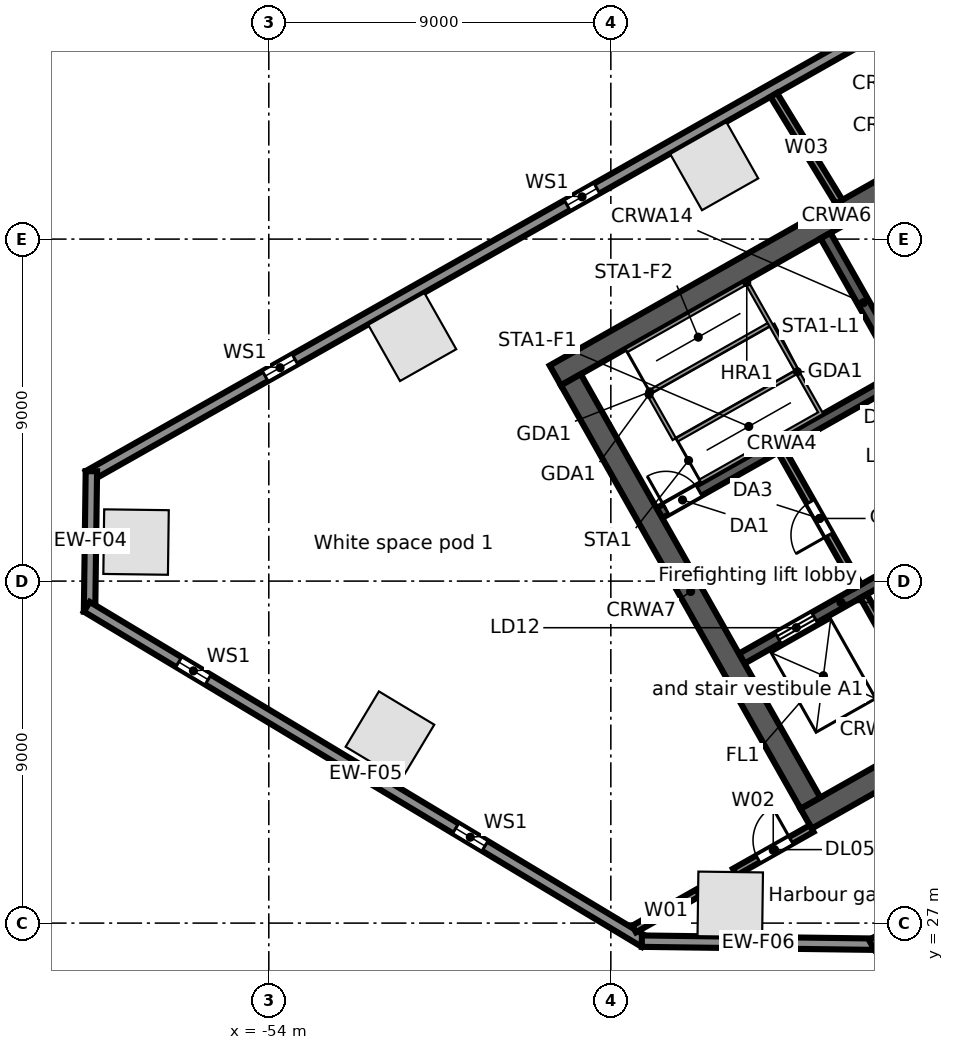
"""IFC4 building model, lengths in metres.
Left out: names, types, materials, properties, quantities, classifications, styles, units other than length and angle.
Written with IfcOpenShell. Run it as: python <this file> out.ifc"""

import sys

from ifc_helpers import new_model, si_unit, direction, frame, frame_2d, origin, origin_2d, place, context, subcontext, project, spatial, rectangle, extrude, element, fill, save


model = new_model("IFC4")
c1 = context("Model", 3, precision=1e-05, world=origin(), true_north=direction((0.0, 1.0)))
c2 = subcontext(c1, "Body", "Model", "MODEL_VIEW")
j1 = project(units=[si_unit("LENGTHUNIT", "METRE"), si_unit("PLANEANGLEUNIT", "RADIAN")], contexts=[c1])
p1 = place(None, origin())
s1 = spatial("IfcSite", under=j1, at=p1, CompositionType="ELEMENT")
p2 = place(p1, origin())
s2 = spatial("IfcBuilding", under=s1, at=p2, CompositionType="ELEMENT")
p3 = place(p2, frame((0.0, 0.0, 36.5)))
s3 = spatial("IfcBuildingStorey", under=s2, at=p3, CompositionType="ELEMENT", Elevation=36.5)
for number, where, z_axis, x_axis in (
    (1, (-42.28, 46.919, 0.0), (0.0, 0.0, 1.0), (-0.87, -0.492, 0.0)),
    (2, (-50.226, 42.423, 0.0), (0.0, 0.0, 1.0), (-0.87, -0.492, 0.0)),
    (3, (-57.493, 37.027, 0.0), (0.0, 0.0, 1.0), (-0.013, -1.0, 0.0)),
    (4, (-50.812, 31.931, 0.0), (0.0, 0.0, 1.0), (0.857, -0.515, 0.0)),
    (5, (-41.858, 27.495, 0.0), (0.0, 0.0, 1.0), (1.0, -0.013, 0.0)),
):
    element("IfcColumn", number, at=place(p3, frame(where, z_axis=z_axis, x_axis=x_axis)), inside=s3, PredefinedType="COLUMN", context=c2, shape_type="SweptSolid", body=[
        extrude(rectangle(XDim=1.7, YDim=1.7, at=origin_2d()), origin(), (0.0, 0.0, 1.0), 5.0),
    ])
p4 = place(p3, frame((-58.745, 38.764, 0.0), z_axis=(0.0, 0.0, 1.0), x_axis=(0.870355811726, 0.492423355453, 0.0)))
e6 = element("IfcWall", 6, at=p4, inside=s3, PredefinedType="STANDARD", context=c2, shape_type="SweptSolid", body=[
    extrude(rectangle(XDim=64.025, YDim=0.3, at=frame_2d((32.013, 0.0))), origin(), (0.0, 0.0, 1.0), 4.68),
])
p5 = place(p4, frame((60.122, 0.0, 0.6)))
e7 = element("IfcOpeningElement", 7, at=p5, cuts=e6, PredefinedType="OPENING", context=c2, shape_type="SweptSolid", body=[
    extrude(rectangle(XDim=0.9, YDim=3.2, at=frame_2d((0.45, 1.6))), frame((0.0, 0.16, 0.0), z_axis=(0.0, -1.0, 0.0), x_axis=(1.0, 0.0, 0.0)), (0.0, 0.0, 1.0), 0.32),
])
p6 = place(p4, frame((50.992, 0.0, 0.6)))
e8 = element("IfcOpeningElement", 8, at=p6, cuts=e6, PredefinedType="OPENING", context=c2, shape_type="SweptSolid", body=[
    extrude(rectangle(XDim=0.9, YDim=3.2, at=frame_2d((0.45, 1.6))), frame((0.0, 0.16, 0.0), z_axis=(0.0, -1.0, 0.0), x_axis=(1.0, 0.0, 0.0)), (0.0, 0.0, 1.0), 0.32),
])
p7 = place(p4, frame((41.862, 0.0, 0.6)))
e9 = element("IfcOpeningElement", 9, at=p7, cuts=e6, PredefinedType="OPENING", context=c2, shape_type="SweptSolid", body=[
    extrude(rectangle(XDim=0.9, YDim=3.2, at=frame_2d((0.45, 1.6))), frame((0.0, 0.16, 0.0), z_axis=(0.0, -1.0, 0.0), x_axis=(1.0, 0.0, 0.0)), (0.0, 0.0, 1.0), 0.32),
])
p8 = place(p4, frame((32.732, 0.0, 0.6)))
e10 = element("IfcOpeningElement", 10, at=p8, cuts=e6, PredefinedType="OPENING", context=c2, shape_type="SweptSolid", body=[
    extrude(rectangle(XDim=0.9, YDim=3.2, at=frame_2d((0.45, 1.6))), frame((0.0, 0.16, 0.0), z_axis=(0.0, -1.0, 0.0), x_axis=(1.0, 0.0, 0.0)), (0.0, 0.0, 1.0), 0.32),
])
p9 = place(p4, frame((23.602, 0.0, 0.6)))
e11 = element("IfcOpeningElement", 11, at=p9, cuts=e6, PredefinedType="OPENING", context=c2, shape_type="SweptSolid", body=[
    extrude(rectangle(XDim=0.9, YDim=3.2, at=frame_2d((0.45, 1.6))), frame((0.0, 0.16, 0.0), z_axis=(0.0, -1.0, 0.0), x_axis=(1.0, 0.0, 0.0)), (0.0, 0.0, 1.0), 0.32),
])
p10 = place(p4, frame((14.472, 0.0, 0.6)))
e12 = element("IfcOpeningElement", 12, at=p10, cuts=e6, PredefinedType="OPENING", context=c2, shape_type="SweptSolid", body=[
    extrude(rectangle(XDim=0.9, YDim=3.2, at=frame_2d((0.45, 1.6))), frame((0.0, 0.16, 0.0), z_axis=(0.0, -1.0, 0.0), x_axis=(1.0, 0.0, 0.0)), (0.0, 0.0, 1.0), 0.32),
])
p11 = place(p4, frame((5.342, 0.0, 0.6)))
e13 = element("IfcOpeningElement", 13, at=p11, cuts=e6, PredefinedType="OPENING", context=c2, shape_type="SweptSolid", body=[
    extrude(rectangle(XDim=0.9, YDim=3.2, at=frame_2d((0.45, 1.6))), frame((0.0, 0.16, 0.0), z_axis=(0.0, -1.0, 0.0), x_axis=(1.0, 0.0, 0.0)), (0.0, 0.0, 1.0), 0.32),
])
p12 = place(p3, frame((-58.717, 35.194, 0.0), z_axis=(0.0, 0.0, 1.0), x_axis=(0.013069053407, 0.999914596275, 0.0)))
e14 = element("IfcWall", 14, at=p12, inside=s3, PredefinedType="STANDARD", context=c2, shape_type="SweptSolid", body=[
    extrude(rectangle(XDim=3.699, YDim=0.3, at=frame_2d((1.849, 0.0))), origin(), (0.0, 0.0, 1.0), 4.68),
])
p13 = place(p3, frame((-44.109, 26.504, 0.0), z_axis=(0.0, 0.0, 1.0), x_axis=(-0.857169502585, 0.515034410344, 0.0)))
e15 = element("IfcWall", 15, at=p13, inside=s3, PredefinedType="STANDARD", context=c2, shape_type="SweptSolid", body=[
    extrude(rectangle(XDim=17.127, YDim=0.3, at=frame_2d((8.563, 0.0))), origin(), (0.0, 0.0, 1.0), 4.68),
])
p14 = place(p13, frame((13.403, 0.0, 0.6)))
e16 = element("IfcOpeningElement", 16, at=p14, cuts=e15, PredefinedType="OPENING", context=c2, shape_type="SweptSolid", body=[
    extrude(rectangle(XDim=0.9, YDim=3.2, at=frame_2d((0.45, 1.6))), frame((0.0, 0.16, 0.0), z_axis=(0.0, -1.0, 0.0), x_axis=(1.0, 0.0, 0.0)), (0.0, 0.0, 1.0), 0.32),
])
p15 = place(p13, frame((4.903, 0.0, 0.6)))
e17 = element("IfcOpeningElement", 17, at=p15, cuts=e15, PredefinedType="OPENING", context=c2, shape_type="SweptSolid", body=[
    extrude(rectangle(XDim=0.9, YDim=3.2, at=frame_2d((0.45, 1.6))), frame((0.0, 0.16, 0.0), z_axis=(0.0, -1.0, 0.0), x_axis=(1.0, 0.0, 0.0)), (0.0, 0.0, 1.0), 0.32),
])
p16 = place(p3, frame((-38.057, 26.445, 0.0), z_axis=(0.0, 0.0, 1.0), x_axis=(-0.999914086342, 0.013108010296, 0.0)))
e18 = element("IfcWall", 18, at=p16, inside=s3, PredefinedType="STANDARD", context=c2, shape_type="SweptSolid", body=[
    extrude(rectangle(XDim=6.128, YDim=0.3, at=frame_2d((3.064, 0.0))), origin(), (0.0, 0.0, 1.0), 4.68),
])
p17 = place(p3, frame((-0.055, 47.969, 0.0), z_axis=(0.0, 0.0, 1.0), x_axis=(-0.870355730478, -0.492423499058, 0.0)))
e19 = element("IfcWall", 19, at=p17, inside=s3, PredefinedType="STANDARD", context=c2, shape_type="SweptSolid", body=[
    extrude(rectangle(XDim=43.75, YDim=0.3, at=frame_2d((21.875, 0.0))), origin(), (0.0, 0.0, 1.0), 4.68),
])
p18 = place(p17, frame((39.977, 0.0, 0.6)))
e20 = element("IfcOpeningElement", 20, at=p18, cuts=e19, PredefinedType="OPENING", context=c2, shape_type="SweptSolid", body=[
    extrude(rectangle(XDim=0.9, YDim=3.2, at=frame_2d((0.45, 1.6))), frame((0.0, 0.16, 0.0), z_axis=(0.0, -1.0, 0.0), x_axis=(1.0, 0.0, 0.0)), (0.0, 0.0, 1.0), 0.32),
])
p19 = place(p17, frame((31.222, 0.0, 0.6)))
e21 = element("IfcOpeningElement", 21, at=p19, cuts=e19, PredefinedType="OPENING", context=c2, shape_type="SweptSolid", body=[
    extrude(rectangle(XDim=0.9, YDim=3.2, at=frame_2d((0.45, 1.6))), frame((0.0, 0.16, 0.0), z_axis=(0.0, -1.0, 0.0), x_axis=(1.0, 0.0, 0.0)), (0.0, 0.0, 1.0), 0.32),
])
p20 = place(p17, frame((22.468, 0.0, 0.6)))
e22 = element("IfcOpeningElement", 22, at=p20, cuts=e19, PredefinedType="OPENING", context=c2, shape_type="SweptSolid", body=[
    extrude(rectangle(XDim=0.9, YDim=3.2, at=frame_2d((0.45, 1.6))), frame((0.0, 0.16, 0.0), z_axis=(0.0, -1.0, 0.0), x_axis=(1.0, 0.0, 0.0)), (0.0, 0.0, 1.0), 0.32),
])
p21 = place(p17, frame((13.713, 0.0, 0.6)))
e23 = element("IfcOpeningElement", 23, at=p21, cuts=e19, PredefinedType="OPENING", context=c2, shape_type="SweptSolid", body=[
    extrude(rectangle(XDim=0.9, YDim=3.2, at=frame_2d((0.45, 1.6))), frame((0.0, 0.16, 0.0), z_axis=(0.0, -1.0, 0.0), x_axis=(1.0, 0.0, 0.0)), (0.0, 0.0, 1.0), 0.32),
])
p22 = place(p17, frame((4.959, 0.0, 0.6)))
e24 = element("IfcOpeningElement", 24, at=p22, cuts=e19, PredefinedType="OPENING", context=c2, shape_type="SweptSolid", body=[
    extrude(rectangle(XDim=0.9, YDim=3.2, at=frame_2d((0.45, 1.6))), frame((0.0, 0.16, 0.0), z_axis=(0.0, -1.0, 0.0), x_axis=(1.0, 0.0, 0.0)), (0.0, 0.0, 1.0), 0.32),
])
p23 = place(p3, frame((-39.862, 29.749, 0.0), z_axis=(0.0, 0.0, 1.0), x_axis=(0.870350116061, 0.492433422375, 0.0)))
e25 = element("IfcWall", 25, at=p23, inside=s3, PredefinedType="SOLIDWALL", context=c2, shape_type="SweptSolid", body=[
    extrude(rectangle(XDim=17.0, YDim=0.6, at=frame_2d((8.5, 0.0))), origin(), (0.0, 0.0, 1.0), 4.68),
])
p24 = place(p23, frame((7.2, 0.0, 0.0)))
e26 = element("IfcOpeningElement", 26, at=p24, cuts=e25, PredefinedType="OPENING", context=c2, shape_type="SweptSolid", body=[
    extrude(rectangle(XDim=1.2, YDim=2.1, at=frame_2d((0.6, 1.05))), frame((0.0, 0.31, 0.0), z_axis=(0.0, -1.0, 0.0), x_axis=(1.0, 0.0, 0.0)), (0.0, 0.0, 1.0), 0.62),
])
p25 = place(p3, frame((-41.556, 33.961, 0.0), z_axis=(0.0, 0.0, 1.0), x_axis=(0.870343731308, 0.492444706919, 0.0)))
e27 = element("IfcWall", 27, at=p25, inside=s3, PredefinedType="SOLIDWALL", context=c2, shape_type="SweptSolid", body=[
    extrude(rectangle(XDim=6.0, YDim=0.3, at=frame_2d((3.0, 0.0))), origin(), (0.0, 0.0, 1.0), 4.68),
])
p26 = place(p25, frame((1.1, 0.0, 0.0)))
e28 = element("IfcOpeningElement", 28, at=p26, cuts=e27, PredefinedType="OPENING", context=c2, shape_type="SweptSolid", body=[
    extrude(rectangle(XDim=1.1, YDim=2.1, at=frame_2d((0.55, 1.05))), frame((0.0, 0.16, 0.0), z_axis=(0.0, -1.0, 0.0), x_axis=(1.0, 0.0, 0.0)), (0.0, 0.0, 1.0), 0.32),
])
p27 = place(p25, frame((4.25, 0.0, 0.0)))
e29 = element("IfcOpeningElement", 29, at=p27, cuts=e27, PredefinedType="OPENING", context=c2, shape_type="SweptSolid", body=[
    extrude(rectangle(XDim=1.1, YDim=2.1, at=frame_2d((0.55, 1.05))), frame((0.0, 0.16, 0.0), z_axis=(0.0, -1.0, 0.0), x_axis=(1.0, 0.0, 0.0)), (0.0, 0.0, 1.0), 0.32),
])
p28 = place(p3, frame((-43.723, 37.791, 0.0), z_axis=(0.0, 0.0, 1.0), x_axis=(0.87035077051, 0.49243226567, 0.0)))
e30 = element("IfcWall", 30, at=p28, inside=s3, PredefinedType="SOLIDWALL", context=c2, shape_type="SweptSolid", body=[
    extrude(rectangle(XDim=7.4, YDim=0.3, at=frame_2d((3.7, 0.0))), origin(), (0.0, 0.0, 1.0), 4.68),
])
p29 = place(p28, frame((0.2, 0.0, 0.0)))
e31 = element("IfcOpeningElement", 31, at=p29, cuts=e30, PredefinedType="OPENING", context=c2, shape_type="SweptSolid", body=[
    extrude(rectangle(XDim=1.0, YDim=2.1, at=frame_2d((0.5, 1.05))), frame((0.0, 0.16, 0.0), z_axis=(0.0, -1.0, 0.0), x_axis=(1.0, 0.0, 0.0)), (0.0, 0.0, 1.0), 0.32),
])
p30 = place(p3, frame((-46.461, 41.412, 0.0), z_axis=(0.0, 0.0, 1.0), x_axis=(0.870350116061, 0.492433422375, 0.0)))
e32 = element("IfcWall", 32, at=p30, inside=s3, PredefinedType="SOLIDWALL", context=c2, shape_type="SweptSolid", body=[
    extrude(rectangle(XDim=17.0, YDim=0.6, at=frame_2d((8.5, 0.0))), origin(), (0.0, 0.0, 1.0), 4.68),
])
p31 = place(p3, frame((-46.052, 41.298, 0.0), z_axis=(0.0, 0.0, 1.0), x_axis=(0.492418598281, -0.870358503186, 0.0)))
e33 = element("IfcWall", 33, at=p31, inside=s3, PredefinedType="SOLIDWALL", context=c2, shape_type="SweptSolid", body=[
    extrude(rectangle(XDim=12.8, YDim=0.6, at=frame_2d((6.4, 0.0))), origin(), (0.0, 0.0, 1.0), 4.68),
])
p32 = place(p3, frame((-38.349, 35.603, 0.0), z_axis=(0.0, 0.0, 1.0), x_axis=(0.49241474071, -0.870360685654, 0.0)))
e34 = element("IfcWall", 34, at=p32, inside=s3, PredefinedType="SOLIDWALL", context=c2, shape_type="SweptSolid", body=[
    extrude(rectangle(XDim=4.05, YDim=0.2, at=frame_2d((2.025, 0.0))), origin(), (0.0, 0.0, 1.0), 4.68),
])
p33 = place(p3, frame((-40.516, 39.433, 0.0), z_axis=(0.0, 0.0, 1.0), x_axis=(0.492453559952, -0.87033872216, 0.0)))
e35 = element("IfcWall", 35, at=p33, inside=s3, PredefinedType="PARTITIONING", context=c2, shape_type="SweptSolid", body=[
    extrude(rectangle(XDim=4.1, YDim=0.2, at=frame_2d((2.05, 0.0))), origin(), (0.0, 0.0, 1.0), 4.68),
])
p34 = place(p33, frame((1.55, 0.0, 0.0)))
e36 = element("IfcOpeningElement", 36, at=p34, cuts=e35, PredefinedType="OPENING", context=c2, shape_type="SweptSolid", body=[
    extrude(rectangle(XDim=1.0, YDim=2.1, at=frame_2d((0.5, 1.05))), frame((0.0, 0.11, 0.0), z_axis=(0.0, -1.0, 0.0), x_axis=(1.0, 0.0, 0.0)), (0.0, 0.0, 1.0), 0.22),
])
p35 = place(p3, frame((-39.35, 45.09, 0.0), z_axis=(0.0, 0.0, 1.0), x_axis=(0.49241474071, -0.870360685654, 0.0)))
e37 = element("IfcWall", 37, at=p35, inside=s3, PredefinedType="SOLIDWALL", context=c2, shape_type="SweptSolid", body=[
    extrude(rectangle(XDim=4.05, YDim=0.3, at=frame_2d((2.025, 0.0))), origin(), (0.0, 0.0, 1.0), 4.68),
])
p36 = place(p3, frame((-44.386, 26.845, 0.0), z_axis=(0.0, 0.0, 1.0), x_axis=(0.870226201187, 0.492652371118, 0.0)))
e38 = element("IfcWall", 38, at=p36, inside=s3, PredefinedType="PARTITIONING", context=c2, shape_type="SweptSolid", body=[
    extrude(rectangle(XDim=1.933, YDim=0.2, at=frame_2d((0.966, 0.0))), origin(), (0.0, 0.0, 1.0), 4.68),
])
p37 = place(p3, frame((-41.738, 28.343, 0.0), z_axis=(0.0, 0.0, 1.0), x_axis=(0.870265350095, 0.492583211676, 0.0)))
e39 = element("IfcWall", 39, at=p37, inside=s3, PredefinedType="PARTITIONING", context=c2, shape_type="SweptSolid", body=[
    extrude(rectangle(XDim=2.324, YDim=0.2, at=frame_2d((1.162, 0.0))), origin(), (0.0, 0.0, 1.0), 4.68),
])
p38 = place(p37, frame((0.7, 0.0, 0.0)))
e40 = element("IfcOpeningElement", 40, at=p38, cuts=e39, PredefinedType="OPENING", context=c2, shape_type="SweptSolid", body=[
    extrude(rectangle(XDim=1.0, YDim=2.1, at=frame_2d((0.5, 1.05))), frame((0.0, 0.11, 0.0), z_axis=(0.0, -1.0, 0.0), x_axis=(1.0, 0.0, 0.0)), (0.0, 0.0, 1.0), 0.22),
])
p39 = place(p3, frame((-40.713, 48.794, 0.0), z_axis=(0.0, 0.0, 1.0), x_axis=(0.52165366254, -0.853157345604, 0.0)))
e41 = element("IfcWall", 41, at=p39, inside=s3, PredefinedType="PARTITIONING", context=c2, shape_type="SweptSolid", body=[
    extrude(rectangle(XDim=3.297, YDim=0.2, at=frame_2d((1.648, 0.0))), origin(), (0.0, 0.0, 1.0), 3.96),
])
p40 = place(p10, origin())
e42 = element("IfcWindow", 42, at=p40, inside=s3, PartitioningType="SINGLE_PANEL", PredefinedType="WINDOW", context=c2, shape_type="SweptSolid", body=[
    extrude(rectangle(XDim=0.9, YDim=3.2, at=frame_2d((0.45, 1.6))), frame((0.0, 0.03, 0.0), z_axis=(0.0, -1.0, 0.0), x_axis=(1.0, 0.0, 0.0)), (0.0, 0.0, 1.0), 0.06),
])
fill(e12, e42)
p41 = place(p11, origin())
e43 = element("IfcWindow", 43, at=p41, inside=s3, PartitioningType="SINGLE_PANEL", PredefinedType="WINDOW", context=c2, shape_type="SweptSolid", body=[
    extrude(rectangle(XDim=0.9, YDim=3.2, at=frame_2d((0.45, 1.6))), frame((0.0, 0.03, 0.0), z_axis=(0.0, -1.0, 0.0), x_axis=(1.0, 0.0, 0.0)), (0.0, 0.0, 1.0), 0.06),
])
fill(e13, e43)
p42 = place(p14, origin())
e44 = element("IfcWindow", 44, at=p42, inside=s3, PartitioningType="SINGLE_PANEL", PredefinedType="WINDOW", context=c2, shape_type="SweptSolid", body=[
    extrude(rectangle(XDim=0.9, YDim=3.2, at=frame_2d((0.45, 1.6))), frame((0.0, 0.03, 0.0), z_axis=(0.0, -1.0, 0.0), x_axis=(1.0, 0.0, 0.0)), (0.0, 0.0, 1.0), 0.06),
])
fill(e16, e44)
p43 = place(p15, origin())
e45 = element("IfcWindow", 45, at=p43, inside=s3, PartitioningType="SINGLE_PANEL", PredefinedType="WINDOW", context=c2, shape_type="SweptSolid", body=[
    extrude(rectangle(XDim=0.9, YDim=3.2, at=frame_2d((0.45, 1.6))), frame((0.0, 0.03, 0.0), z_axis=(0.0, -1.0, 0.0), x_axis=(1.0, 0.0, 0.0)), (0.0, 0.0, 1.0), 0.06),
])
fill(e17, e45)
p44 = place(p26, origin())
e46 = element("IfcDoor", 46, at=p44, inside=s3, OperationType="DOUBLE_DOOR_SLIDING", PredefinedType="DOOR", context=c2, shape_type="SweptSolid", body=[
    extrude(rectangle(XDim=1.1, YDim=2.1, at=frame_2d((0.55, 1.05))), frame((0.0, 0.025, 0.0), z_axis=(0.0, -1.0, 0.0), x_axis=(1.0, 0.0, 0.0)), (0.0, 0.0, 1.0), 0.05),
])
fill(e28, e46)
p45 = place(p29, origin())
e47 = element("IfcDoor", 47, at=p45, inside=s3, OperationType="SINGLE_SWING_LEFT", PredefinedType="DOOR", context=c2, shape_type="SweptSolid", body=[
    extrude(rectangle(XDim=1.0, YDim=2.1, at=frame_2d((0.5, 1.05))), frame((0.0, 0.025, 0.0), z_axis=(0.0, -1.0, 0.0), x_axis=(1.0, 0.0, 0.0)), (0.0, 0.0, 1.0), 0.05),
])
fill(e31, e47)
p46 = place(p34, frame((1.0, 0.0, 0.0), z_axis=(0.0, 0.0, 1.0), x_axis=(-1.0, 0.0, 0.0)))
e48 = element("IfcDoor", 48, at=p46, inside=s3, OperationType="SINGLE_SWING_LEFT", PredefinedType="DOOR", context=c2, shape_type="SweptSolid", body=[
    extrude(rectangle(XDim=1.0, YDim=2.1, at=frame_2d((0.5, 1.05))), frame((0.0, 0.025, 0.0), z_axis=(0.0, -1.0, 0.0), x_axis=(1.0, 0.0, 0.0)), (0.0, 0.0, 1.0), 0.05),
])
fill(e36, e48)
p47 = place(p38, origin())
e49 = element("IfcDoor", 49, at=p47, inside=s3, OperationType="SINGLE_SWING_RIGHT", PredefinedType="DOOR", context=c2, shape_type="SweptSolid", body=[
    extrude(rectangle(XDim=1.0, YDim=2.1, at=frame_2d((0.5, 1.05))), frame((0.0, 0.025, 0.0), z_axis=(0.0, -1.0, 0.0), x_axis=(1.0, 0.0, 0.0)), (0.0, 0.0, 1.0), 0.05),
])
fill(e40, e49)
save(model, sys.argv[1])
